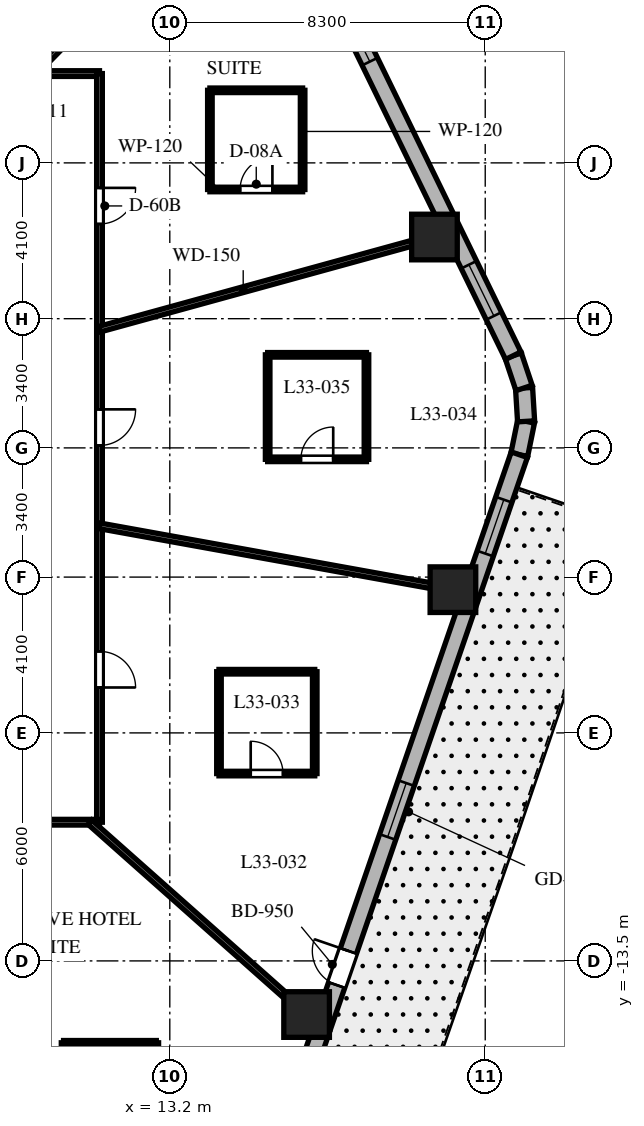
"""IFC4 building model, lengths in metres.
Left out: names, types, materials, properties, quantities, classifications, styles, units other than length and angle.
Written with IfcOpenShell. Run it as: python <this file> out.ifc"""

import sys

from ifc_helpers import new_model, si_unit, direction, frame, frame_2d, origin, origin_2d, place, context, subcontext, project, spatial, rectangle, extrude, element, fill, save


model = new_model("IFC4")
c1 = context("Model", 3, precision=1e-05, world=origin(), true_north=direction((0.0, 1.0)))
c2 = subcontext(c1, "Body", "Model", "MODEL_VIEW")
j1 = project(units=[si_unit("LENGTHUNIT", "METRE"), si_unit("PLANEANGLEUNIT", "RADIAN")], contexts=[c1])
p1 = place(None, origin())
s1 = spatial("IfcSite", under=j1, at=p1, CompositionType="ELEMENT")
p2 = place(p1, origin())
s2 = spatial("IfcBuilding", under=s1, at=p2, CompositionType="ELEMENT")
p3 = place(p2, frame((0.0, 0.0, 135.8)))
s3 = spatial("IfcBuildingStorey", under=s2, at=p3, CompositionType="ELEMENT", Elevation=135.8)
for number, where, z_axis, x_axis in (
    (1, (16.8, -14.911, 0.0), (0.0, 0.0, 1.0), (1.0, 0.0, 0.0)),
    (2, (20.65, -3.731, 0.0), (0.0, 0.0, 1.0), (1.0, 0.0, 0.0)),
    (3, (20.164, 5.549, 0.0), (0.0, 0.0, 1.0), (1.0, 0.0, 0.0)),
):
    element("IfcColumn", number, at=place(p3, frame(where, z_axis=z_axis, x_axis=x_axis)), inside=s3, PredefinedType="COLUMN", context=c2, shape_type="SweptSolid", body=[
        extrude(rectangle(XDim=1.2, YDim=1.2, at=origin_2d()), origin(), (0.0, 0.0, 1.0), 3.7),
    ])
p4 = place(p3, frame((22.397, -0.179, 0.0), z_axis=(0.0, 0.0, 1.0), x_axis=(0.199313589404, 0.979935759669, 0.0)))
e4 = element("IfcWall", 4, at=p4, inside=s3, PredefinedType="SOLIDWALL", context=c2, shape_type="SweptSolid", body=[
    extrude(rectangle(XDim=0.896, YDim=0.45, at=frame_2d((0.448, 0.0))), origin(), (0.0, 0.0, 1.0), 3.38),
])
p5 = place(p3, frame((22.575, 0.698, 0.0), z_axis=(0.0, 0.0, 1.0), x_axis=(-0.060980441946, 0.998138961117, 0.0)))
e5 = element("IfcWall", 5, at=p5, inside=s3, PredefinedType="SOLIDWALL", context=c2, shape_type="SweptSolid", body=[
    extrude(rectangle(XDim=0.881, YDim=0.45, at=frame_2d((0.44, 0.0))), origin(), (0.0, 0.0, 1.0), 3.38),
])
p6 = place(p3, frame((22.522, 1.577, 0.0), z_axis=(0.0, 0.0, 1.0), x_axis=(-0.317372694837, 0.948300887151, 0.0)))
e6 = element("IfcWall", 6, at=p6, inside=s3, PredefinedType="SOLIDWALL", context=c2, shape_type="SweptSolid", body=[
    extrude(rectangle(XDim=0.896, YDim=0.45, at=frame_2d((0.448, 0.0))), origin(), (0.0, 0.0, 1.0), 3.38),
])
p7 = place(p3, frame((15.992, -18.777, 0.0), z_axis=(0.0, 0.0, 1.0), x_axis=(0.325606988926, 0.945505202927, 0.0)))
e7 = element("IfcWall", 7, at=p7, inside=s3, PredefinedType="SOLIDWALL", context=c2, shape_type="SweptSolid", body=[
    extrude(rectangle(XDim=19.669, YDim=0.45, at=frame_2d((9.835, 0.0))), origin(), (0.0, 0.0, 1.0), 3.38),
])
p8 = place(p7, frame((4.909, 0.0, 0.0)))
e8 = element("IfcOpeningElement", 8, at=p8, cuts=e7, PredefinedType="OPENING", context=c2, shape_type="SweptSolid", body=[
    extrude(rectangle(XDim=0.95, YDim=2.15, at=frame_2d((0.475, 1.075))), frame((0.0, 0.235, 0.0), z_axis=(0.0, -1.0, 0.0), x_axis=(1.0, 0.0, 0.0)), (0.0, 0.0, 1.0), 0.47),
])
p9 = place(p7, frame((1.197, 0.0, 0.8)))
e9 = element("IfcOpeningElement", 9, at=p9, cuts=e7, PredefinedType="OPENING", context=c2, shape_type="SweptSolid", body=[
    extrude(rectangle(XDim=1.5, YDim=1.8, at=frame_2d((0.75, 0.9))), frame((0.0, 0.235, 0.0), z_axis=(0.0, -1.0, 0.0), x_axis=(1.0, 0.0, 0.0)), (0.0, 0.0, 1.0), 0.47),
])
p10 = place(p7, frame((9.03, 0.0, 0.8)))
e10 = element("IfcOpeningElement", 10, at=p10, cuts=e7, PredefinedType="OPENING", context=c2, shape_type="SweptSolid", body=[
    extrude(rectangle(XDim=1.5, YDim=1.8, at=frame_2d((0.75, 0.9))), frame((0.0, 0.235, 0.0), z_axis=(0.0, -1.0, 0.0), x_axis=(1.0, 0.0, 0.0)), (0.0, 0.0, 1.0), 0.47),
])
p11 = place(p7, frame((16.918, 0.0, 0.8)))
e11 = element("IfcOpeningElement", 11, at=p11, cuts=e7, PredefinedType="OPENING", context=c2, shape_type="SweptSolid", body=[
    extrude(rectangle(XDim=1.5, YDim=1.8, at=frame_2d((0.75, 0.9))), frame((0.0, 0.235, 0.0), z_axis=(0.0, -1.0, 0.0), x_axis=(1.0, 0.0, 0.0)), (0.0, 0.0, 1.0), 0.47),
])
p12 = place(p3, frame((22.238, 2.427, 0.0), z_axis=(0.0, 0.0, 1.0), x_axis=(-0.438374803278, 0.898792262901, 0.0)))
e12 = element("IfcWall", 12, at=p12, inside=s3, PredefinedType="SOLIDWALL", context=c2, shape_type="SweptSolid", body=[
    extrude(rectangle(XDim=18.618, YDim=0.45, at=frame_2d((9.309, 0.0))), origin(), (0.0, 0.0, 1.0), 3.38),
])
p13 = place(p12, frame((8.61, 0.0, 0.8)))
e13 = element("IfcOpeningElement", 13, at=p13, cuts=e12, PredefinedType="OPENING", context=c2, shape_type="SweptSolid", body=[
    extrude(rectangle(XDim=1.5, YDim=1.8, at=frame_2d((0.75, 0.9))), frame((0.0, 0.235, 0.0), z_axis=(0.0, -1.0, 0.0), x_axis=(1.0, 0.0, 0.0)), (0.0, 0.0, 1.0), 0.47),
])
p14 = place(p12, frame((16.006, 0.0, 0.8)))
e14 = element("IfcOpeningElement", 14, at=p14, cuts=e12, PredefinedType="OPENING", context=c2, shape_type="SweptSolid", body=[
    extrude(rectangle(XDim=1.5, YDim=1.8, at=frame_2d((0.75, 0.9))), frame((0.0, 0.235, 0.0), z_axis=(0.0, -1.0, 0.0), x_axis=(1.0, 0.0, 0.0)), (0.0, 0.0, 1.0), 0.47),
])
p15 = place(p12, frame((1.163, 0.0, 0.8)))
e15 = element("IfcOpeningElement", 15, at=p15, cuts=e12, PredefinedType="OPENING", context=c2, shape_type="SweptSolid", body=[
    extrude(rectangle(XDim=1.5, YDim=1.8, at=frame_2d((0.75, 0.9))), frame((0.0, 0.235, 0.0), z_axis=(0.0, -1.0, 0.0), x_axis=(1.0, 0.0, 0.0)), (0.0, 0.0, 1.0), 0.47),
])
p16 = place(p3, frame((-11.35, 9.85, 0.0), z_axis=(0.0, 0.0, 1.0), x_axis=(1.0, 0.0, 0.0)))
e16 = element("IfcWall", 16, at=p16, inside=s3, PredefinedType="PARTITIONING", context=c2, shape_type="SweptSolid", body=[
    extrude(rectangle(XDim=22.7, YDim=0.15, at=frame_2d((11.35, 0.0))), origin(), (0.0, 0.0, 1.0), 2.82),
])
p17 = place(p16, frame((17.237, 0.0, 0.0)))
e17 = element("IfcOpeningElement", 17, at=p17, cuts=e16, PredefinedType="OPENING", context=c2, shape_type="SweptSolid", body=[
    extrude(rectangle(XDim=0.95, YDim=2.03, at=frame_2d((0.475, 1.015))), frame((0.0, 0.085, 0.0), z_axis=(0.0, -1.0, 0.0), x_axis=(1.0, 0.0, 0.0)), (0.0, 0.0, 1.0), 0.17),
])
p18 = place(p16, frame((10.45, 0.0, 0.0)))
e18 = element("IfcOpeningElement", 18, at=p18, cuts=e16, PredefinedType="OPENING", context=c2, shape_type="SweptSolid", body=[
    extrude(rectangle(XDim=0.95, YDim=2.03, at=frame_2d((0.475, 1.015))), frame((0.0, 0.085, 0.0), z_axis=(0.0, -1.0, 0.0), x_axis=(1.0, 0.0, 0.0)), (0.0, 0.0, 1.0), 0.17),
])
p19 = place(p16, frame((5.522, 0.0, 0.0)))
e19 = element("IfcOpeningElement", 19, at=p19, cuts=e16, PredefinedType="OPENING", context=c2, shape_type="SweptSolid", body=[
    extrude(rectangle(XDim=0.9, YDim=2.03, at=frame_2d((0.45, 1.015))), frame((0.0, 0.085, 0.0), z_axis=(0.0, -1.0, 0.0), x_axis=(1.0, 0.0, 0.0)), (0.0, 0.0, 1.0), 0.17),
])
p20 = place(p16, frame((1.914, 0.0, 0.0)))
e20 = element("IfcOpeningElement", 20, at=p20, cuts=e16, PredefinedType="OPENING", context=c2, shape_type="SweptSolid", body=[
    extrude(rectangle(XDim=0.9, YDim=2.03, at=frame_2d((0.45, 1.015))), frame((0.0, 0.085, 0.0), z_axis=(0.0, -1.0, 0.0), x_axis=(1.0, 0.0, 0.0)), (0.0, 0.0, 1.0), 0.17),
])
p21 = place(p3, frame((11.35, 9.85, 0.0), z_axis=(0.0, 0.0, 1.0), x_axis=(0.0, -1.0, 0.0)))
e21 = element("IfcWall", 21, at=p21, inside=s3, PredefinedType="PARTITIONING", context=c2, shape_type="SweptSolid", body=[
    extrude(rectangle(XDim=19.7, YDim=0.15, at=frame_2d((9.85, 0.0))), origin(), (0.0, 0.0, 1.0), 2.82),
])
p22 = place(p21, frame((3.008, 0.0, 0.0)))
e22 = element("IfcOpeningElement", 22, at=p22, cuts=e21, PredefinedType="OPENING", context=c2, shape_type="SweptSolid", body=[
    extrude(rectangle(XDim=0.95, YDim=2.03, at=frame_2d((0.475, 1.015))), frame((0.0, 0.085, 0.0), z_axis=(0.0, -1.0, 0.0), x_axis=(1.0, 0.0, 0.0)), (0.0, 0.0, 1.0), 0.17),
])
p23 = place(p21, frame((15.205, 0.0, 0.0)))
e23 = element("IfcOpeningElement", 23, at=p23, cuts=e21, PredefinedType="OPENING", context=c2, shape_type="SweptSolid", body=[
    extrude(rectangle(XDim=0.95, YDim=2.03, at=frame_2d((0.475, 1.015))), frame((0.0, 0.085, 0.0), z_axis=(0.0, -1.0, 0.0), x_axis=(1.0, 0.0, 0.0)), (0.0, 0.0, 1.0), 0.17),
])
p24 = place(p21, frame((8.836, 0.0, 0.0)))
e24 = element("IfcOpeningElement", 24, at=p24, cuts=e21, PredefinedType="OPENING", context=c2, shape_type="SweptSolid", body=[
    extrude(rectangle(XDim=0.95, YDim=2.03, at=frame_2d((0.475, 1.015))), frame((0.0, 0.085, 0.0), z_axis=(0.0, -1.0, 0.0), x_axis=(1.0, 0.0, 0.0)), (0.0, 0.0, 1.0), 0.17),
])
p25 = place(p3, frame((11.35, -9.85, 0.0), z_axis=(0.0, 0.0, 1.0), x_axis=(-1.0, 0.0, 0.0)))
e25 = element("IfcWall", 25, at=p25, inside=s3, PredefinedType="PARTITIONING", context=c2, shape_type="SweptSolid", body=[
    extrude(rectangle(XDim=22.7, YDim=0.15, at=frame_2d((11.35, 0.0))), origin(), (0.0, 0.0, 1.0), 2.82),
])
p26 = place(p25, frame((17.237, 0.0, 0.0)))
e26 = element("IfcOpeningElement", 26, at=p26, cuts=e25, PredefinedType="OPENING", context=c2, shape_type="SweptSolid", body=[
    extrude(rectangle(XDim=0.95, YDim=2.03, at=frame_2d((0.475, 1.015))), frame((0.0, 0.085, 0.0), z_axis=(0.0, -1.0, 0.0), x_axis=(1.0, 0.0, 0.0)), (0.0, 0.0, 1.0), 0.17),
])
p27 = place(p25, frame((10.45, 0.0, 0.0)))
e27 = element("IfcOpeningElement", 27, at=p27, cuts=e25, PredefinedType="OPENING", context=c2, shape_type="SweptSolid", body=[
    extrude(rectangle(XDim=0.95, YDim=2.03, at=frame_2d((0.475, 1.015))), frame((0.0, 0.085, 0.0), z_axis=(0.0, -1.0, 0.0), x_axis=(1.0, 0.0, 0.0)), (0.0, 0.0, 1.0), 0.17),
])
p28 = place(p25, frame((3.399, 0.0, 0.0)))
e28 = element("IfcOpeningElement", 28, at=p28, cuts=e25, PredefinedType="OPENING", context=c2, shape_type="SweptSolid", body=[
    extrude(rectangle(XDim=0.95, YDim=2.03, at=frame_2d((0.475, 1.015))), frame((0.0, 0.085, 0.0), z_axis=(0.0, -1.0, 0.0), x_axis=(1.0, 0.0, 0.0)), (0.0, 0.0, 1.0), 0.17),
])
p29 = place(p3, frame((11.35, 3.123, 0.0), z_axis=(0.0, 0.0, 1.0), x_axis=(0.964151983214, 0.265350623261, 0.0)))
e29 = element("IfcWall", 29, at=p29, inside=s3, PredefinedType="PARTITIONING", context=c2, shape_type="SweptSolid", body=[
    extrude(rectangle(XDim=9.645, YDim=0.15, at=frame_2d((4.823, 0.0))), origin(), (0.0, 0.0, 1.0), 2.52),
])
p30 = place(p3, frame((9.628, 9.85, 0.0), z_axis=(0.0, 0.0, 1.0), x_axis=(0.698992824326, 0.715128681805, 0.0)))
e30 = element("IfcWall", 30, at=p30, inside=s3, PredefinedType="PARTITIONING", context=c2, shape_type="SweptSolid", body=[
    extrude(rectangle(XDim=8.579, YDim=0.15, at=frame_2d((4.29, 0.0))), origin(), (0.0, 0.0, 1.0), 2.52),
])
p31 = place(p3, frame((11.098, -9.85, 0.0), z_axis=(0.0, 0.0, 1.0), x_axis=(0.747904295103, -0.663806572253, 0.0)))
e31 = element("IfcWall", 31, at=p31, inside=s3, PredefinedType="PARTITIONING", context=c2, shape_type="SweptSolid", body=[
    extrude(rectangle(XDim=8.16, YDim=0.15, at=frame_2d((4.08, 0.0))), origin(), (0.0, 0.0, 1.0), 2.52),
])
p32 = place(p3, frame((11.35, -2.051, 0.0), z_axis=(0.0, 0.0, 1.0), x_axis=(0.984068313063, -0.177790762484, 0.0)))
e32 = element("IfcWall", 32, at=p32, inside=s3, PredefinedType="PARTITIONING", context=c2, shape_type="SweptSolid", body=[
    extrude(rectangle(XDim=9.951, YDim=0.15, at=frame_2d((4.976, 0.0))), origin(), (0.0, 0.0, 1.0), 2.52),
])
p33 = place(p3, frame((14.255, 6.8, 0.0), z_axis=(0.0, 0.0, 1.0), x_axis=(1.0, 0.0, 0.0)))
e33 = element("IfcWall", 33, at=p33, inside=s3, PredefinedType="PARTITIONING", context=c2, shape_type="SweptSolid", body=[
    extrude(rectangle(XDim=2.44, YDim=0.12, at=frame_2d((1.22, 0.0))), origin(), (0.0, 0.0, 1.0), 2.906),
])
p34 = place(p33, frame((0.795, 0.0, 0.0)))
e34 = element("IfcOpeningElement", 34, at=p34, cuts=e33, PredefinedType="OPENING", context=c2, shape_type="SweptSolid", body=[
    extrude(rectangle(XDim=0.85, YDim=2.03, at=frame_2d((0.425, 1.015))), frame((0.0, 0.07, 0.0), z_axis=(0.0, -1.0, 0.0), x_axis=(1.0, 0.0, 0.0)), (0.0, 0.0, 1.0), 0.14),
])
p35 = place(p3, frame((16.695, 6.8, 0.0), z_axis=(0.0, 0.0, 1.0), x_axis=(0.0, 1.0, 0.0)))
e35 = element("IfcWall", 35, at=p35, inside=s3, PredefinedType="PARTITIONING", context=c2, shape_type="SweptSolid", body=[
    extrude(rectangle(XDim=2.61, YDim=0.12, at=frame_2d((1.305, 0.0))), origin(), (0.0, 0.0, 1.0), 3.38),
])
p36 = place(p3, frame((16.695, 9.41, 0.0), z_axis=(0.0, 0.0, 1.0), x_axis=(-1.0, 0.0, 0.0)))
e36 = element("IfcWall", 36, at=p36, inside=s3, PredefinedType="PARTITIONING", context=c2, shape_type="SweptSolid", body=[
    extrude(rectangle(XDim=2.44, YDim=0.12, at=frame_2d((1.22, 0.0))), origin(), (0.0, 0.0, 1.0), 2.906),
])
p37 = place(p3, frame((14.255, 9.41, 0.0), z_axis=(0.0, 0.0, 1.0), x_axis=(0.0, -1.0, 0.0)))
e37 = element("IfcWall", 37, at=p37, inside=s3, PredefinedType="PARTITIONING", context=c2, shape_type="SweptSolid", body=[
    extrude(rectangle(XDim=2.61, YDim=0.12, at=frame_2d((1.305, 0.0))), origin(), (0.0, 0.0, 1.0), 3.38),
])
p38 = place(p3, frame((12.845, -18.265, 0.0), z_axis=(0.0, 0.0, 1.0), x_axis=(0.0, 1.0, 0.0)))
e38 = element("IfcWall", 38, at=p38, inside=s3, PredefinedType="PARTITIONING", context=c2, shape_type="SweptSolid", body=[
    extrude(rectangle(XDim=2.61, YDim=0.12, at=frame_2d((1.305, 0.0))), origin(), (0.0, 0.0, 1.0), 2.52),
])
p39 = place(p3, frame((12.845, -15.655, 0.0), z_axis=(0.0, 0.0, 1.0), x_axis=(-1.0, 0.0, 0.0)))
e39 = element("IfcWall", 39, at=p39, inside=s3, PredefinedType="PARTITIONING", context=c2, shape_type="SweptSolid", body=[
    extrude(rectangle(XDim=2.44, YDim=0.12, at=frame_2d((1.22, 0.0))), origin(), (0.0, 0.0, 1.0), 3.38),
])
p40 = place(p3, frame((10.405, -15.655, 0.0), z_axis=(0.0, 0.0, 1.0), x_axis=(0.0, -1.0, 0.0)))
e40 = element("IfcWall", 40, at=p40, inside=s3, PredefinedType="PARTITIONING", context=c2, shape_type="SweptSolid", body=[
    extrude(rectangle(XDim=2.61, YDim=0.12, at=frame_2d((1.305, 0.0))), origin(), (0.0, 0.0, 1.0), 3.38),
])
p41 = place(p3, frame((14.494, -8.57, 0.0), z_axis=(0.0, 0.0, 1.0), x_axis=(1.0, 0.0, 0.0)))
e41 = element("IfcWall", 41, at=p41, inside=s3, PredefinedType="PARTITIONING", context=c2, shape_type="SweptSolid", body=[
    extrude(rectangle(XDim=2.52, YDim=0.12, at=frame_2d((1.26, 0.0))), origin(), (0.0, 0.0, 1.0), 2.952),
])
p42 = place(p41, frame((0.835, 0.0, 0.0)))
e42 = element("IfcOpeningElement", 42, at=p42, cuts=e41, PredefinedType="OPENING", context=c2, shape_type="SweptSolid", body=[
    extrude(rectangle(XDim=0.85, YDim=2.03, at=frame_2d((0.425, 1.015))), frame((0.0, 0.07, 0.0), z_axis=(0.0, -1.0, 0.0), x_axis=(1.0, 0.0, 0.0)), (0.0, 0.0, 1.0), 0.14),
])
p43 = place(p3, frame((17.014, -8.57, 0.0), z_axis=(0.0, 0.0, 1.0), x_axis=(0.0, 1.0, 0.0)))
e43 = element("IfcWall", 43, at=p43, inside=s3, PredefinedType="PARTITIONING", context=c2, shape_type="SweptSolid", body=[
    extrude(rectangle(XDim=2.68, YDim=0.12, at=frame_2d((1.34, 0.0))), origin(), (0.0, 0.0, 1.0), 3.38),
])
p44 = place(p3, frame((17.014, -5.89, 0.0), z_axis=(0.0, 0.0, 1.0), x_axis=(-1.0, 0.0, 0.0)))
e44 = element("IfcWall", 44, at=p44, inside=s3, PredefinedType="PARTITIONING", context=c2, shape_type="SweptSolid", body=[
    extrude(rectangle(XDim=2.52, YDim=0.12, at=frame_2d((1.26, 0.0))), origin(), (0.0, 0.0, 1.0), 2.82),
])
p45 = place(p3, frame((14.494, -5.89, 0.0), z_axis=(0.0, 0.0, 1.0), x_axis=(0.0, -1.0, 0.0)))
e45 = element("IfcWall", 45, at=p45, inside=s3, PredefinedType="PARTITIONING", context=c2, shape_type="SweptSolid", body=[
    extrude(rectangle(XDim=2.68, YDim=0.12, at=frame_2d((1.34, 0.0))), origin(), (0.0, 0.0, 1.0), 3.38),
])
p46 = place(p3, frame((15.775, -0.301, 0.0), z_axis=(0.0, 0.0, 1.0), x_axis=(1.0, 0.0, 0.0)))
e46 = element("IfcWall", 46, at=p46, inside=s3, PredefinedType="PARTITIONING", context=c2, shape_type="SweptSolid", body=[
    extrude(rectangle(XDim=2.6, YDim=0.12, at=frame_2d((1.3, 0.0))), origin(), (0.0, 0.0, 1.0), 2.821),
])
p47 = place(p46, frame((0.875, 0.0, 0.0)))
e47 = element("IfcOpeningElement", 47, at=p47, cuts=e46, PredefinedType="OPENING", context=c2, shape_type="SweptSolid", body=[
    extrude(rectangle(XDim=0.85, YDim=2.03, at=frame_2d((0.425, 1.015))), frame((0.0, 0.07, 0.0), z_axis=(0.0, -1.0, 0.0), x_axis=(1.0, 0.0, 0.0)), (0.0, 0.0, 1.0), 0.14),
])
p48 = place(p3, frame((18.375, -0.301, 0.0), z_axis=(0.0, 0.0, 1.0), x_axis=(0.0, 1.0, 0.0)))
e48 = element("IfcWall", 48, at=p48, inside=s3, PredefinedType="PARTITIONING", context=c2, shape_type="SweptSolid", body=[
    extrude(rectangle(XDim=2.75, YDim=0.12, at=frame_2d((1.375, 0.0))), origin(), (0.0, 0.0, 1.0), 3.38),
])
p49 = place(p3, frame((18.375, 2.449, 0.0), z_axis=(0.0, 0.0, 1.0), x_axis=(-1.0, 0.0, 0.0)))
e49 = element("IfcWall", 49, at=p49, inside=s3, PredefinedType="PARTITIONING", context=c2, shape_type="SweptSolid", body=[
    extrude(rectangle(XDim=2.6, YDim=0.12, at=frame_2d((1.3, 0.0))), origin(), (0.0, 0.0, 1.0), 2.821),
])
p50 = place(p3, frame((15.775, 2.449, 0.0), z_axis=(0.0, 0.0, 1.0), x_axis=(0.0, -1.0, 0.0)))
e50 = element("IfcWall", 50, at=p50, inside=s3, PredefinedType="PARTITIONING", context=c2, shape_type="SweptSolid", body=[
    extrude(rectangle(XDim=2.75, YDim=0.12, at=frame_2d((1.375, 0.0))), origin(), (0.0, 0.0, 1.0), 3.38),
])
p51 = place(p8, origin())
e51 = element("IfcDoor", 51, at=p51, inside=s3, OperationType="SINGLE_SWING_RIGHT", PredefinedType="DOOR", context=c2, shape_type="SweptSolid", body=[
    extrude(rectangle(XDim=0.95, YDim=2.15, at=frame_2d((0.475, 1.075))), frame((0.0, 0.025, 0.0), z_axis=(0.0, -1.0, 0.0), x_axis=(1.0, 0.0, 0.0)), (0.0, 0.0, 1.0), 0.05),
])
fill(e8, e51)
p52 = place(p10, origin())
e52 = element("IfcWindow", 52, at=p52, inside=s3, PartitioningType="SINGLE_PANEL", PredefinedType="WINDOW", context=c2, shape_type="SweptSolid", body=[
    extrude(rectangle(XDim=1.5, YDim=1.8, at=frame_2d((0.75, 0.9))), frame((0.0, 0.03, 0.0), z_axis=(0.0, -1.0, 0.0), x_axis=(1.0, 0.0, 0.0)), (0.0, 0.0, 1.0), 0.06),
])
fill(e10, e52)
p53 = place(p11, origin())
e53 = element("IfcWindow", 53, at=p53, inside=s3, PartitioningType="SINGLE_PANEL", PredefinedType="WINDOW", context=c2, shape_type="SweptSolid", body=[
    extrude(rectangle(XDim=1.5, YDim=1.8, at=frame_2d((0.75, 0.9))), frame((0.0, 0.03, 0.0), z_axis=(0.0, -1.0, 0.0), x_axis=(1.0, 0.0, 0.0)), (0.0, 0.0, 1.0), 0.06),
])
fill(e11, e53)
p54 = place(p13, origin())
e54 = element("IfcWindow", 54, at=p54, inside=s3, PartitioningType="SINGLE_PANEL", PredefinedType="WINDOW", context=c2, shape_type="SweptSolid", body=[
    extrude(rectangle(XDim=1.5, YDim=1.8, at=frame_2d((0.75, 0.9))), frame((0.0, 0.03, 0.0), z_axis=(0.0, -1.0, 0.0), x_axis=(1.0, 0.0, 0.0)), (0.0, 0.0, 1.0), 0.06),
])
fill(e13, e54)
p55 = place(p15, origin())
e55 = element("IfcWindow", 55, at=p55, inside=s3, PartitioningType="SINGLE_PANEL", PredefinedType="WINDOW", context=c2, shape_type="SweptSolid", body=[
    extrude(rectangle(XDim=1.5, YDim=1.8, at=frame_2d((0.75, 0.9))), frame((0.0, 0.03, 0.0), z_axis=(0.0, -1.0, 0.0), x_axis=(1.0, 0.0, 0.0)), (0.0, 0.0, 1.0), 0.06),
])
fill(e15, e55)
p56 = place(p22, origin())
e56 = element("IfcDoor", 56, at=p56, inside=s3, OperationType="SINGLE_SWING_LEFT", PredefinedType="DOOR", context=c2, shape_type="SweptSolid", body=[
    extrude(rectangle(XDim=0.95, YDim=2.03, at=frame_2d((0.475, 1.015))), frame((0.0, 0.025, 0.0), z_axis=(0.0, -1.0, 0.0), x_axis=(1.0, 0.0, 0.0)), (0.0, 0.0, 1.0), 0.05),
])
fill(e22, e56)
p57 = place(p34, origin())
e57 = element("IfcDoor", 57, at=p57, inside=s3, OperationType="SINGLE_SWING_RIGHT", PredefinedType="DOOR", context=c2, shape_type="SweptSolid", body=[
    extrude(rectangle(XDim=0.85, YDim=2.03, at=frame_2d((0.425, 1.015))), frame((0.0, 0.025, 0.0), z_axis=(0.0, -1.0, 0.0), x_axis=(1.0, 0.0, 0.0)), (0.0, 0.0, 1.0), 0.05),
])
fill(e34, e57)
p58 = place(p23, origin())
e58 = element("IfcDoor", 58, at=p58, inside=s3, OperationType="SINGLE_SWING_RIGHT", PredefinedType="DOOR", context=c2, shape_type="SweptSolid", body=[
    extrude(rectangle(XDim=0.95, YDim=2.03, at=frame_2d((0.475, 1.015))), frame((0.0, 0.025, 0.0), z_axis=(0.0, -1.0, 0.0), x_axis=(1.0, 0.0, 0.0)), (0.0, 0.0, 1.0), 0.05),
])
fill(e23, e58)
p59 = place(p42, origin())
e59 = element("IfcDoor", 59, at=p59, inside=s3, OperationType="SINGLE_SWING_LEFT", PredefinedType="DOOR", context=c2, shape_type="SweptSolid", body=[
    extrude(rectangle(XDim=0.85, YDim=2.03, at=frame_2d((0.425, 1.015))), frame((0.0, 0.025, 0.0), z_axis=(0.0, -1.0, 0.0), x_axis=(1.0, 0.0, 0.0)), (0.0, 0.0, 1.0), 0.05),
])
fill(e42, e59)
p60 = place(p24, origin())
e60 = element("IfcDoor", 60, at=p60, inside=s3, OperationType="SINGLE_SWING_LEFT", PredefinedType="DOOR", context=c2, shape_type="SweptSolid", body=[
    extrude(rectangle(XDim=0.95, YDim=2.03, at=frame_2d((0.475, 1.015))), frame((0.0, 0.025, 0.0), z_axis=(0.0, -1.0, 0.0), x_axis=(1.0, 0.0, 0.0)), (0.0, 0.0, 1.0), 0.05),
])
fill(e24, e60)
p61 = place(p47, origin())
e61 = element("IfcDoor", 61, at=p61, inside=s3, OperationType="SINGLE_SWING_RIGHT", PredefinedType="DOOR", context=c2, shape_type="SweptSolid", body=[
    extrude(rectangle(XDim=0.85, YDim=2.03, at=frame_2d((0.425, 1.015))), frame((0.0, 0.025, 0.0), z_axis=(0.0, -1.0, 0.0), x_axis=(1.0, 0.0, 0.0)), (0.0, 0.0, 1.0), 0.05),
])
fill(e47, e61)
save(model, sys.argv[1])
